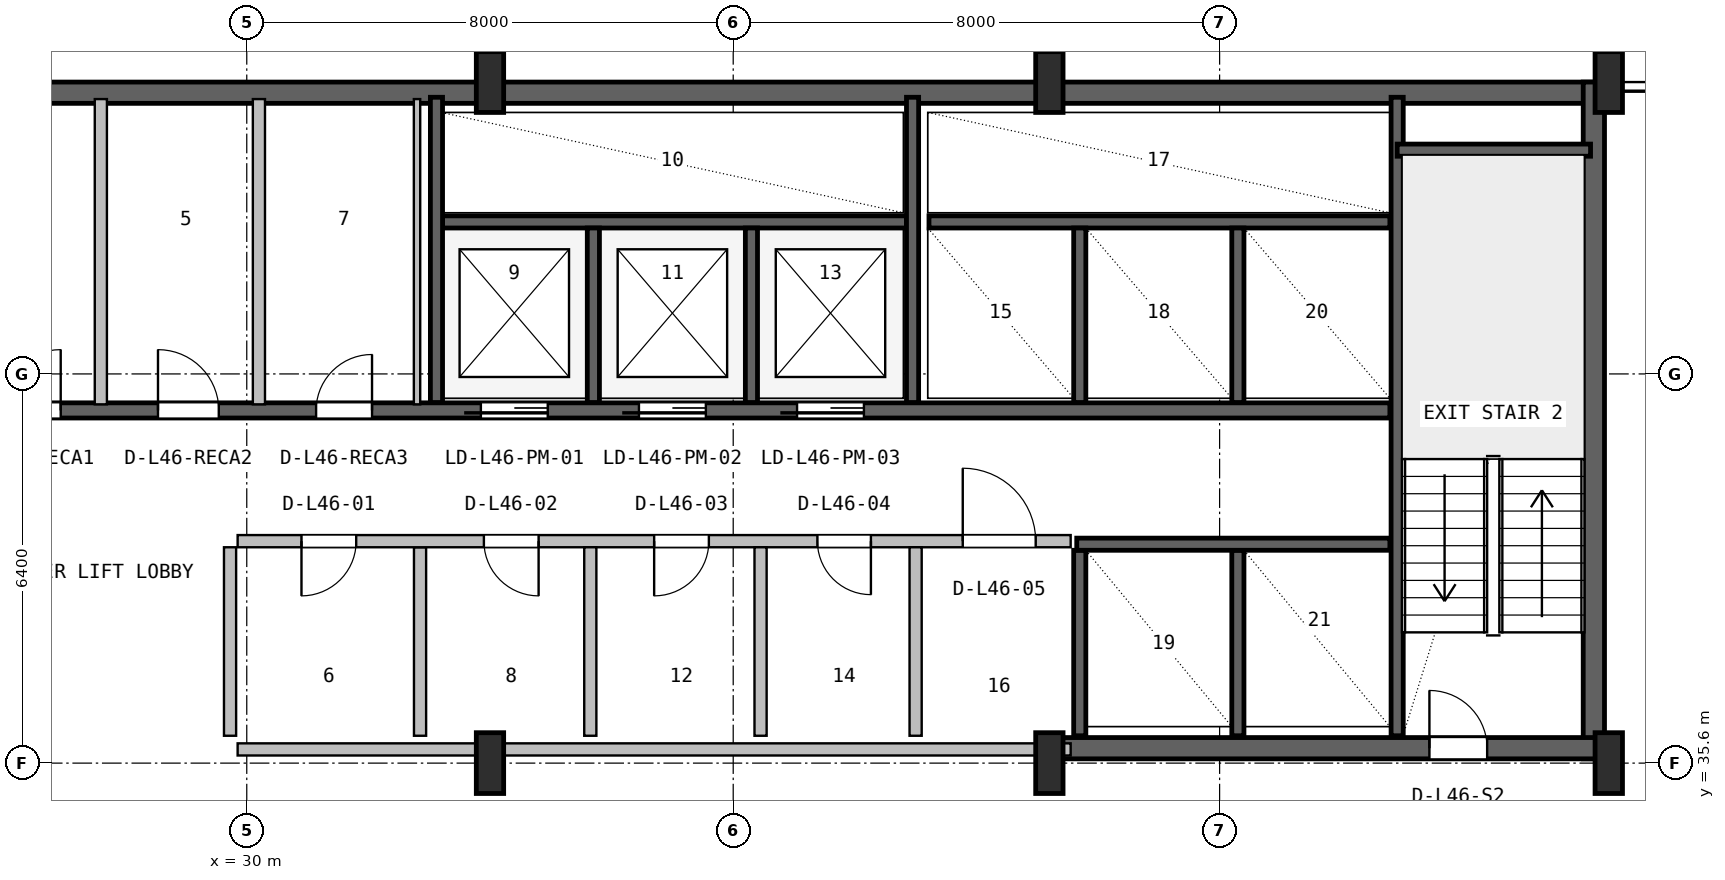
"""IFC4 building model, lengths in metres.
Left out: names, types, materials, properties, quantities, classifications, styles, units other than length and angle.
Written with IfcOpenShell. Run it as: python <this file> out.ifc"""

import sys

from ifc_helpers import new_model, si_unit, direction, frame, frame_2d, origin, origin_2d, place, context, subcontext, project, spatial, rectangle, i_section, extrude, source, transform, mapped, element, fill, save


model = new_model("IFC4")
c1 = context("Model", 3, precision=1e-05, world=origin(), true_north=direction((0.0, 1.0)))
c2 = subcontext(c1, "Body", "Model", "MODEL_VIEW")
j1 = project(units=[si_unit("LENGTHUNIT", "METRE"), si_unit("PLANEANGLEUNIT", "RADIAN")], contexts=[c1])
p1 = place(None, origin())
s1 = spatial("IfcSite", under=j1, at=p1, CompositionType="ELEMENT")
p2 = place(p1, origin())
s2 = spatial("IfcBuilding", under=s1, at=p2, CompositionType="ELEMENT")
p3 = place(p2, frame((0.0, 0.0, 187.6)))
s3 = spatial("IfcBuildingStorey", under=s2, at=p3, CompositionType="ELEMENT", Elevation=187.6)
p4 = place(p3, frame((15.6, 46.625, 0.0), z_axis=(0.0, 0.0, 1.0), x_axis=(1.0, 0.0, 0.0)))
e1 = element("IfcWall", 1, at=p4, inside=s3, PredefinedType="SHEAR", context=c2, shape_type="SweptSolid", body=[
    extrude(rectangle(XDim=36.8, YDim=0.35, at=frame_2d((18.4, 0.0))), origin(), (0.0, 0.0, 1.0), 3.52),
])
p5 = place(p3, frame((52.155, 35.67, 0.0), z_axis=(0.0, 0.0, 1.0), x_axis=(0.0, 1.0, 0.0)))
e2 = element("IfcWall", 2, at=p5, inside=s3, PredefinedType="SHEAR", context=c2, shape_type="SweptSolid", body=[
    extrude(rectangle(XDim=11.13, YDim=0.35, at=frame_2d((5.565, 0.0))), origin(), (0.0, 0.0, 1.0), 3.52),
])
p6 = place(p3, frame((43.2, 35.845, 0.0), z_axis=(0.0, 0.0, 1.0), x_axis=(1.0, 0.0, 0.0)))
e3 = element("IfcWall", 3, at=p6, inside=s3, PredefinedType="SHEAR", context=c2, shape_type="SweptSolid", body=[
    extrude(rectangle(XDim=9.13, YDim=0.35, at=frame_2d((4.565, 0.0))), origin(), (0.0, 0.0, 1.0), 3.52),
])
p7 = place(p6, frame((6.25, 0.0, 0.0)))
e4 = element("IfcOpeningElement", 4, at=p7, cuts=e3, PredefinedType="OPENING", context=c2, shape_type="SweptSolid", body=[
    extrude(rectangle(XDim=0.95, YDim=2.1, at=frame_2d((0.475, 1.05))), frame((0.0, 0.185, 0.0), z_axis=(0.0, -1.0, 0.0), x_axis=(1.0, 0.0, 0.0)), (0.0, 0.0, 1.0), 0.37),
])
m1 = source(origin(), c2, "Body", "SweptSolid", [
    extrude(i_section(OverallWidth=0.45, OverallDepth=1.0, WebThickness=0.016, FlangeThickness=0.03, FilletRadius=0.016, at=origin_2d()), origin(), (0.0, 0.0, 1.0), 3.8),
])
for number, where, z_axis, x_axis in (
    (5, (34.0, 35.6, 0.0), (0.0, 0.0, 1.0), (1.0, 0.0, 0.0)),
    (6, (34.0, 46.8, 0.0), (0.0, 0.0, 1.0), (1.0, 0.0, 0.0)),
    (7, (43.2, 35.6, 0.0), (0.0, 0.0, 1.0), (1.0, 0.0, 0.0)),
    (8, (43.2, 46.8, 0.0), (0.0, 0.0, 1.0), (1.0, 0.0, 0.0)),
    (9, (52.4, 35.6, 0.0), (0.0, 0.0, 1.0), (1.0, 0.0, 0.0)),
    (10, (52.4, 46.8, 0.0), (0.0, 0.0, 1.0), (1.0, 0.0, 0.0)),
):
    element("IfcColumn", number, at=place(p3, frame(where, z_axis=z_axis, x_axis=x_axis)), inside=s3, PredefinedType="COLUMN", context=c2, shape_type="MappedRepresentation", body=[
        mapped(m1, transform((0.0, 0.0, 0.0), x_axis=(1.0, 0.0, 0.0), y_axis=(0.0, 1.0, 0.0), z_axis=(0.0, 0.0, 1.0), scale=1.0)),
    ])
p8 = place(p3, frame((48.92, 36.05, 0.0), z_axis=(0.0, 0.0, 1.0), x_axis=(0.0, 1.0, 0.0)))
e11 = element("IfcWall", 11, at=p8, inside=s3, PredefinedType="SHEAR", context=c2, shape_type="SweptSolid", body=[
    extrude(rectangle(XDim=10.5, YDim=0.2, at=frame_2d((5.25, 0.0))), origin(), (0.0, 0.0, 1.0), 3.52),
])
p9 = place(p3, frame((48.92, 45.68, 0.0), z_axis=(0.0, 0.0, 1.0), x_axis=(1.0, 0.0, 0.0)))
e12 = element("IfcWall", 12, at=p9, inside=s3, PredefinedType="SHEAR", context=c2, shape_type="SweptSolid", body=[
    extrude(rectangle(XDim=3.18, YDim=0.2, at=frame_2d((1.59, 0.0))), origin(), (0.0, 0.0, 1.0), 3.52),
])
p10 = place(p3, frame((24.98, 41.4, 0.0), z_axis=(0.0, 0.0, 1.0), x_axis=(1.0, 0.0, 0.0)))
e13 = element("IfcWall", 13, at=p10, inside=s3, PredefinedType="SHEAR", context=c2, shape_type="SweptSolid", body=[
    extrude(rectangle(XDim=23.82, YDim=0.25, at=frame_2d((11.91, 0.0))), origin(), (0.0, 0.0, 1.0), 3.52),
])
p11 = place(p10, frame((8.87, 0.0, 0.0)))
e14 = element("IfcOpeningElement", 14, at=p11, cuts=e13, PredefinedType="OPENING", context=c2, shape_type="SweptSolid", body=[
    extrude(rectangle(XDim=1.1, YDim=2.18, at=frame_2d((0.55, 1.09))), frame((0.0, 0.135, 0.0), z_axis=(0.0, -1.0, 0.0), x_axis=(1.0, 0.0, 0.0)), (0.0, 0.0, 1.0), 0.27),
])
p12 = place(p10, frame((11.47, 0.0, 0.0)))
e15 = element("IfcOpeningElement", 15, at=p12, cuts=e13, PredefinedType="OPENING", context=c2, shape_type="SweptSolid", body=[
    extrude(rectangle(XDim=1.1, YDim=2.18, at=frame_2d((0.55, 1.09))), frame((0.0, 0.135, 0.0), z_axis=(0.0, -1.0, 0.0), x_axis=(1.0, 0.0, 0.0)), (0.0, 0.0, 1.0), 0.27),
])
p13 = place(p10, frame((14.07, 0.0, 0.0)))
e16 = element("IfcOpeningElement", 16, at=p13, cuts=e13, PredefinedType="OPENING", context=c2, shape_type="SweptSolid", body=[
    extrude(rectangle(XDim=1.1, YDim=2.18, at=frame_2d((0.55, 1.09))), frame((0.0, 0.135, 0.0), z_axis=(0.0, -1.0, 0.0), x_axis=(1.0, 0.0, 0.0)), (0.0, 0.0, 1.0), 0.27),
])
p14 = place(p10, frame((0.96, 0.0, 0.0)))
e17 = element("IfcOpeningElement", 17, at=p14, cuts=e13, PredefinedType="OPENING", context=c2, shape_type="SweptSolid", body=[
    extrude(rectangle(XDim=1.0, YDim=2.08, at=frame_2d((0.5, 1.04))), frame((0.0, 0.135, 0.0), z_axis=(0.0, -1.0, 0.0), x_axis=(1.0, 0.0, 0.0)), (0.0, 0.0, 1.0), 0.27),
])
p15 = place(p10, frame((3.56, 0.0, 0.0)))
e18 = element("IfcOpeningElement", 18, at=p15, cuts=e13, PredefinedType="OPENING", context=c2, shape_type="SweptSolid", body=[
    extrude(rectangle(XDim=1.0, YDim=2.08, at=frame_2d((0.5, 1.04))), frame((0.0, 0.135, 0.0), z_axis=(0.0, -1.0, 0.0), x_axis=(1.0, 0.0, 0.0)), (0.0, 0.0, 1.0), 0.27),
])
p16 = place(p10, frame((6.16, 0.0, 0.0)))
e19 = element("IfcOpeningElement", 19, at=p16, cuts=e13, PredefinedType="OPENING", context=c2, shape_type="SweptSolid", body=[
    extrude(rectangle(XDim=0.92, YDim=2.08, at=frame_2d((0.46, 1.04))), frame((0.0, 0.135, 0.0), z_axis=(0.0, -1.0, 0.0), x_axis=(1.0, 0.0, 0.0)), (0.0, 0.0, 1.0), 0.27),
])
p17 = place(p3, frame((33.22, 44.5, 0.0), z_axis=(0.0, 0.0, 1.0), x_axis=(1.0, 0.0, 0.0)))
e20 = element("IfcWall", 20, at=p17, inside=s3, PredefinedType="SHEAR", context=c2, shape_type="SweptSolid", body=[
    extrude(rectangle(XDim=7.63, YDim=0.2, at=frame_2d((3.815, 0.0))), origin(), (0.0, 0.0, 1.0), 3.52),
])
p18 = place(p3, frame((33.12, 41.53, 0.0), z_axis=(0.0, 0.0, 1.0), x_axis=(0.0, 1.0, 0.0)))
e21 = element("IfcWall", 21, at=p18, inside=s3, PredefinedType="SHEAR", context=c2, shape_type="SweptSolid", body=[
    extrude(rectangle(XDim=5.02, YDim=0.2, at=frame_2d((2.51, 0.0))), origin(), (0.0, 0.0, 1.0), 3.52),
])
for number, where, z_axis, x_axis in (
    (22, (35.7, 41.53, 0.0), (0.0, 0.0, 1.0), (0.0, 1.0, 0.0)),
    (23, (38.3, 41.53, 0.0), (0.0, 0.0, 1.0), (0.0, 1.0, 0.0)),
):
    element("IfcWall", number, at=place(p3, frame(where, z_axis=z_axis, x_axis=x_axis)), inside=s3, PredefinedType="SHEAR", context=c2, shape_type="SweptSolid", body=[
        extrude(rectangle(XDim=2.87, YDim=0.2, at=frame_2d((1.435, 0.0))), origin(), (0.0, 0.0, 1.0), 3.52),
    ])
p19 = place(p3, frame((40.95, 41.53, 0.0), z_axis=(0.0, 0.0, 1.0), x_axis=(0.0, 1.0, 0.0)))
e24 = element("IfcWall", 24, at=p19, inside=s3, PredefinedType="SHEAR", context=c2, shape_type="SweptSolid", body=[
    extrude(rectangle(XDim=5.02, YDim=0.2, at=frame_2d((2.51, 0.0))), origin(), (0.0, 0.0, 1.0), 3.52),
])
p20 = place(p3, frame((41.22, 44.5, 0.0), z_axis=(0.0, 0.0, 1.0), x_axis=(1.0, 0.0, 0.0)))
e25 = element("IfcWall", 25, at=p20, inside=s3, PredefinedType="SHEAR", context=c2, shape_type="SweptSolid", body=[
    extrude(rectangle(XDim=7.58, YDim=0.2, at=frame_2d((3.79, 0.0))), origin(), (0.0, 0.0, 1.0), 3.52),
])
for number, where, z_axis, x_axis in (
    (26, (43.7, 41.53, 0.0), (0.0, 0.0, 1.0), (0.0, 1.0, 0.0)),
    (27, (46.3, 41.53, 0.0), (0.0, 0.0, 1.0), (0.0, 1.0, 0.0)),
):
    element("IfcWall", number, at=place(p3, frame(where, z_axis=z_axis, x_axis=x_axis)), inside=s3, PredefinedType="SHEAR", context=c2, shape_type="SweptSolid", body=[
        extrude(rectangle(XDim=2.87, YDim=0.2, at=frame_2d((1.435, 0.0))), origin(), (0.0, 0.0, 1.0), 3.52),
    ])
for number, where, z_axis, x_axis in (
    (28, (43.7, 36.05, 0.0), (0.0, 0.0, 1.0), (0.0, 1.0, 0.0)),
    (29, (46.3, 36.05, 0.0), (0.0, 0.0, 1.0), (0.0, 1.0, 0.0)),
):
    element("IfcWall", number, at=place(p3, frame(where, z_axis=z_axis, x_axis=x_axis)), inside=s3, PredefinedType="SHEAR", context=c2, shape_type="SweptSolid", body=[
        extrude(rectangle(XDim=3.05, YDim=0.2, at=frame_2d((1.525, 0.0))), origin(), (0.0, 0.0, 1.0), 3.52),
    ])
p21 = place(p3, frame((43.65, 39.2, 0.0), z_axis=(0.0, 0.0, 1.0), x_axis=(1.0, 0.0, 0.0)))
e30 = element("IfcWall", 30, at=p21, inside=s3, PredefinedType="SHEAR", context=c2, shape_type="SweptSolid", body=[
    extrude(rectangle(XDim=5.15, YDim=0.2, at=frame_2d((2.575, 0.0))), origin(), (0.0, 0.0, 1.0), 3.52),
])
p22 = place(p3, frame((29.85, 35.825, 0.0), z_axis=(0.0, 0.0, 1.0), x_axis=(1.0, 0.0, 0.0)))
e31 = element("IfcWall", 31, at=p22, inside=s3, PredefinedType="SOLIDWALL", context=c2, shape_type="SweptSolid", body=[
    extrude(rectangle(XDim=13.7, YDim=0.2, at=frame_2d((6.85, 0.0))), origin(), (0.0, 0.0, 1.0), 2.545),
])
p23 = place(p3, frame((32.85, 36.05, 0.0), z_axis=(0.0, 0.0, 1.0), x_axis=(0.0, 1.0, 0.0)))
e32 = element("IfcWall", 32, at=p23, inside=s3, PredefinedType="PLUMBINGWALL", context=c2, shape_type="SweptSolid", body=[
    extrude(rectangle(XDim=3.1, YDim=0.2, at=frame_2d((1.55, 0.0))), origin(), (0.0, 0.0, 1.0), 3.5),
])
p24 = place(p3, frame((29.85, 39.25, 0.0), z_axis=(0.0, 0.0, 1.0), x_axis=(1.0, 0.0, 0.0)))
e33 = element("IfcWall", 33, at=p24, inside=s3, PredefinedType="SOLIDWALL", context=c2, shape_type="SweptSolid", body=[
    extrude(rectangle(XDim=13.7, YDim=0.2, at=frame_2d((6.85, 0.0))), origin(), (0.0, 0.0, 1.0), 3.5),
])
p25 = place(p24, frame((1.05, 0.0, 0.0)))
e34 = element("IfcOpeningElement", 34, at=p25, cuts=e33, PredefinedType="OPENING", context=c2, shape_type="SweptSolid", body=[
    extrude(rectangle(XDim=0.9, YDim=2.06, at=frame_2d((0.45, 1.03))), frame((0.0, 0.11, 0.0), z_axis=(0.0, -1.0, 0.0), x_axis=(1.0, 0.0, 0.0)), (0.0, 0.0, 1.0), 0.22),
])
p26 = place(p24, frame((4.05, 0.0, 0.0)))
e35 = element("IfcOpeningElement", 35, at=p26, cuts=e33, PredefinedType="OPENING", context=c2, shape_type="SweptSolid", body=[
    extrude(rectangle(XDim=0.9, YDim=2.06, at=frame_2d((0.45, 1.03))), frame((0.0, 0.11, 0.0), z_axis=(0.0, -1.0, 0.0), x_axis=(1.0, 0.0, 0.0)), (0.0, 0.0, 1.0), 0.22),
])
p27 = place(p24, frame((6.85, 0.0, 0.0)))
e36 = element("IfcOpeningElement", 36, at=p27, cuts=e33, PredefinedType="OPENING", context=c2, shape_type="SweptSolid", body=[
    extrude(rectangle(XDim=0.9, YDim=2.06, at=frame_2d((0.45, 1.03))), frame((0.0, 0.11, 0.0), z_axis=(0.0, -1.0, 0.0), x_axis=(1.0, 0.0, 0.0)), (0.0, 0.0, 1.0), 0.22),
])
p28 = place(p24, frame((9.535, 0.0, 0.0)))
e37 = element("IfcOpeningElement", 37, at=p28, cuts=e33, PredefinedType="OPENING", context=c2, shape_type="SweptSolid", body=[
    extrude(rectangle(XDim=0.88, YDim=2.06, at=frame_2d((0.44, 1.03))), frame((0.0, 0.11, 0.0), z_axis=(0.0, -1.0, 0.0), x_axis=(1.0, 0.0, 0.0)), (0.0, 0.0, 1.0), 0.22),
])
p29 = place(p24, frame((11.925, 0.0, 0.0)))
e38 = element("IfcOpeningElement", 38, at=p29, cuts=e33, PredefinedType="OPENING", context=c2, shape_type="SweptSolid", body=[
    extrude(rectangle(XDim=1.2, YDim=2.1, at=frame_2d((0.6, 1.05))), frame((0.0, 0.11, 0.0), z_axis=(0.0, -1.0, 0.0), x_axis=(1.0, 0.0, 0.0)), (0.0, 0.0, 1.0), 0.22),
])
for number, where, z_axis, x_axis in (
    (39, (29.725, 36.05, 0.0), (0.0, 0.0, 1.0), (0.0, 1.0, 0.0)),
    (40, (35.65, 36.05, 0.0), (0.0, 0.0, 1.0), (0.0, 1.0, 0.0)),
    (41, (38.45, 36.05, 0.0), (0.0, 0.0, 1.0), (0.0, 1.0, 0.0)),
):
    element("IfcWall", number, at=place(p3, frame(where, z_axis=z_axis, x_axis=x_axis)), inside=s3, PredefinedType="PLUMBINGWALL", context=c2, shape_type="SweptSolid", body=[
        extrude(rectangle(XDim=3.1, YDim=0.2, at=frame_2d((1.55, 0.0))), origin(), (0.0, 0.0, 1.0), 3.5),
    ])
p30 = place(p3, frame((41.0, 36.05, 0.0), z_axis=(0.0, 0.0, 1.0), x_axis=(0.0, 1.0, 0.0)))
e42 = element("IfcWall", 42, at=p30, inside=s3, PredefinedType="SOLIDWALL", context=c2, shape_type="SweptSolid", body=[
    extrude(rectangle(XDim=3.1, YDim=0.2, at=frame_2d((1.55, 0.0))), origin(), (0.0, 0.0, 1.0), 3.5),
])
for number, where, z_axis, x_axis in (
    (43, (27.6, 41.5, 0.0), (0.0, 0.0, 1.0), (0.0, 1.0, 0.0)),
    (44, (30.2, 41.5, 0.0), (0.0, 0.0, 1.0), (0.0, 1.0, 0.0)),
):
    element("IfcWall", number, at=place(p3, frame(where, z_axis=z_axis, x_axis=x_axis)), inside=s3, PredefinedType="SOLIDWALL", context=c2, shape_type="SweptSolid", body=[
        extrude(rectangle(XDim=5.02, YDim=0.2, at=frame_2d((2.51, 0.0))), origin(), (0.0, 0.0, 1.0), 3.5),
    ])
p31 = place(p3, frame((32.8, 41.5, 0.0), z_axis=(0.0, 0.0, 1.0), x_axis=(0.0, 1.0, 0.0)))
e45 = element("IfcWall", 45, at=p31, inside=s3, PredefinedType="PARTITIONING", context=c2, shape_type="SweptSolid", body=[
    extrude(rectangle(XDim=5.02, YDim=0.105, at=frame_2d((2.51, 0.0))), origin(), (0.0, 0.0, 1.0), 3.5),
])
m2 = source(origin(), c2, "Body", "SweptSolid", [
    extrude(rectangle(XDim=0.95, YDim=2.1, at=frame_2d((0.475, 1.05))), frame((0.0, 0.025, 0.0), z_axis=(0.0, -1.0, 0.0), x_axis=(1.0, 0.0, 0.0)), (0.0, 0.0, 1.0), 0.05),
])
p32 = place(p7, origin())
e46 = element("IfcDoor", 46, at=p32, inside=s3, OperationType="SINGLE_SWING_LEFT", PredefinedType="DOOR", context=c2, shape_type="MappedRepresentation", body=[
    mapped(m2, transform((0.0, 0.0, 0.0), x_axis=(1.0, 0.0, 0.0), y_axis=(0.0, 1.0, 0.0), z_axis=(0.0, 0.0, 1.0), scale=1.0)),
])
fill(e4, e46)
m3 = source(origin(), c2, "Body", "SweptSolid", [
    extrude(rectangle(XDim=1.1, YDim=2.18, at=frame_2d((0.55, 1.09))), frame((0.0, 0.025, 0.0), z_axis=(0.0, -1.0, 0.0), x_axis=(1.0, 0.0, 0.0)), (0.0, 0.0, 1.0), 0.05),
])
p33 = place(p11, frame((1.1, 0.0, 0.0), z_axis=(0.0, 0.0, 1.0), x_axis=(-1.0, 0.0, 0.0)))
e47 = element("IfcDoor", 47, at=p33, inside=s3, OperationType="SLIDING_TO_LEFT", PredefinedType="DOOR", context=c2, shape_type="MappedRepresentation", body=[
    mapped(m3, transform((0.0, 0.0, 0.0), x_axis=(1.0, 0.0, 0.0), y_axis=(0.0, 1.0, 0.0), z_axis=(0.0, 0.0, 1.0), scale=1.0)),
])
fill(e14, e47)
p34 = place(p12, frame((1.1, 0.0, 0.0), z_axis=(0.0, 0.0, 1.0), x_axis=(-1.0, 0.0, 0.0)))
e48 = element("IfcDoor", 48, at=p34, inside=s3, OperationType="SLIDING_TO_LEFT", PredefinedType="DOOR", context=c2, shape_type="MappedRepresentation", body=[
    mapped(m3, transform((0.0, 0.0, 0.0), x_axis=(1.0, 0.0, 0.0), y_axis=(0.0, 1.0, 0.0), z_axis=(0.0, 0.0, 1.0), scale=1.0)),
])
fill(e15, e48)
p35 = place(p13, frame((1.1, 0.0, 0.0), z_axis=(0.0, 0.0, 1.0), x_axis=(-1.0, 0.0, 0.0)))
e49 = element("IfcDoor", 49, at=p35, inside=s3, OperationType="SLIDING_TO_LEFT", PredefinedType="DOOR", context=c2, shape_type="MappedRepresentation", body=[
    mapped(m3, transform((0.0, 0.0, 0.0), x_axis=(1.0, 0.0, 0.0), y_axis=(0.0, 1.0, 0.0), z_axis=(0.0, 0.0, 1.0), scale=1.0)),
])
fill(e16, e49)
m4 = source(origin(), c2, "Body", "SweptSolid", [
    extrude(rectangle(XDim=1.0, YDim=2.08, at=frame_2d((0.5, 1.04))), frame((0.0, 0.025, 0.0), z_axis=(0.0, -1.0, 0.0), x_axis=(1.0, 0.0, 0.0)), (0.0, 0.0, 1.0), 0.05),
])
p36 = place(p14, origin())
e50 = element("IfcDoor", 50, at=p36, inside=s3, OperationType="SINGLE_SWING_RIGHT", PredefinedType="DOOR", context=c2, shape_type="MappedRepresentation", body=[
    mapped(m4, transform((0.0, 0.0, 0.0), x_axis=(1.0, 0.0, 0.0), y_axis=(0.0, 1.0, 0.0), z_axis=(0.0, 0.0, 1.0), scale=1.0)),
])
fill(e17, e50)
p37 = place(p15, origin())
e51 = element("IfcDoor", 51, at=p37, inside=s3, OperationType="SINGLE_SWING_LEFT", PredefinedType="DOOR", context=c2, shape_type="MappedRepresentation", body=[
    mapped(m4, transform((0.0, 0.0, 0.0), x_axis=(1.0, 0.0, 0.0), y_axis=(0.0, 1.0, 0.0), z_axis=(0.0, 0.0, 1.0), scale=1.0)),
])
fill(e18, e51)
m5 = source(origin(), c2, "Body", "SweptSolid", [
    extrude(rectangle(XDim=0.92, YDim=2.08, at=frame_2d((0.46, 1.04))), frame((0.0, 0.025, 0.0), z_axis=(0.0, -1.0, 0.0), x_axis=(1.0, 0.0, 0.0)), (0.0, 0.0, 1.0), 0.05),
])
p38 = place(p16, origin())
e52 = element("IfcDoor", 52, at=p38, inside=s3, OperationType="SINGLE_SWING_RIGHT", PredefinedType="DOOR", context=c2, shape_type="MappedRepresentation", body=[
    mapped(m5, transform((0.0, 0.0, 0.0), x_axis=(1.0, 0.0, 0.0), y_axis=(0.0, 1.0, 0.0), z_axis=(0.0, 0.0, 1.0), scale=1.0)),
])
fill(e19, e52)
m6 = source(origin(), c2, "Body", "SweptSolid", [
    extrude(rectangle(XDim=0.9, YDim=2.06, at=frame_2d((0.45, 1.03))), frame((0.0, 0.025, 0.0), z_axis=(0.0, -1.0, 0.0), x_axis=(1.0, 0.0, 0.0)), (0.0, 0.0, 1.0), 0.05),
])
p39 = place(p25, frame((0.9, 0.0, 0.0), z_axis=(0.0, 0.0, 1.0), x_axis=(-1.0, 0.0, 0.0)))
e53 = element("IfcDoor", 53, at=p39, inside=s3, OperationType="SINGLE_SWING_LEFT", PredefinedType="DOOR", context=c2, shape_type="MappedRepresentation", body=[
    mapped(m6, transform((0.0, 0.0, 0.0), x_axis=(1.0, 0.0, 0.0), y_axis=(0.0, 1.0, 0.0), z_axis=(0.0, 0.0, 1.0), scale=1.0)),
])
fill(e34, e53)
p40 = place(p26, frame((0.9, 0.0, 0.0), z_axis=(0.0, 0.0, 1.0), x_axis=(-1.0, 0.0, 0.0)))
e54 = element("IfcDoor", 54, at=p40, inside=s3, OperationType="SINGLE_SWING_RIGHT", PredefinedType="DOOR", context=c2, shape_type="MappedRepresentation", body=[
    mapped(m6, transform((0.0, 0.0, 0.0), x_axis=(1.0, 0.0, 0.0), y_axis=(0.0, 1.0, 0.0), z_axis=(0.0, 0.0, 1.0), scale=1.0)),
])
fill(e35, e54)
p41 = place(p27, frame((0.9, 0.0, 0.0), z_axis=(0.0, 0.0, 1.0), x_axis=(-1.0, 0.0, 0.0)))
e55 = element("IfcDoor", 55, at=p41, inside=s3, OperationType="SINGLE_SWING_LEFT", PredefinedType="DOOR", context=c2, shape_type="MappedRepresentation", body=[
    mapped(m6, transform((0.0, 0.0, 0.0), x_axis=(1.0, 0.0, 0.0), y_axis=(0.0, 1.0, 0.0), z_axis=(0.0, 0.0, 1.0), scale=1.0)),
])
fill(e36, e55)
m7 = source(origin(), c2, "Body", "SweptSolid", [
    extrude(rectangle(XDim=0.88, YDim=2.06, at=frame_2d((0.44, 1.03))), frame((0.0, 0.025, 0.0), z_axis=(0.0, -1.0, 0.0), x_axis=(1.0, 0.0, 0.0)), (0.0, 0.0, 1.0), 0.05),
])
p42 = place(p28, frame((0.88, 0.0, 0.0), z_axis=(0.0, 0.0, 1.0), x_axis=(-1.0, 0.0, 0.0)))
e56 = element("IfcDoor", 56, at=p42, inside=s3, OperationType="SINGLE_SWING_RIGHT", PredefinedType="DOOR", context=c2, shape_type="MappedRepresentation", body=[
    mapped(m7, transform((0.0, 0.0, 0.0), x_axis=(1.0, 0.0, 0.0), y_axis=(0.0, 1.0, 0.0), z_axis=(0.0, 0.0, 1.0), scale=1.0)),
])
fill(e37, e56)
m8 = source(origin(), c2, "Body", "SweptSolid", [
    extrude(rectangle(XDim=1.2, YDim=2.1, at=frame_2d((0.6, 1.05))), frame((0.0, 0.025, 0.0), z_axis=(0.0, -1.0, 0.0), x_axis=(1.0, 0.0, 0.0)), (0.0, 0.0, 1.0), 0.05),
])
p43 = place(p29, origin())
e57 = element("IfcDoor", 57, at=p43, inside=s3, OperationType="SINGLE_SWING_LEFT", PredefinedType="DOOR", context=c2, shape_type="MappedRepresentation", body=[
    mapped(m8, transform((0.0, 0.0, 0.0), x_axis=(1.0, 0.0, 0.0), y_axis=(0.0, 1.0, 0.0), z_axis=(0.0, 0.0, 1.0), scale=1.0)),
])
fill(e38, e57)
save(model, sys.argv[1])
